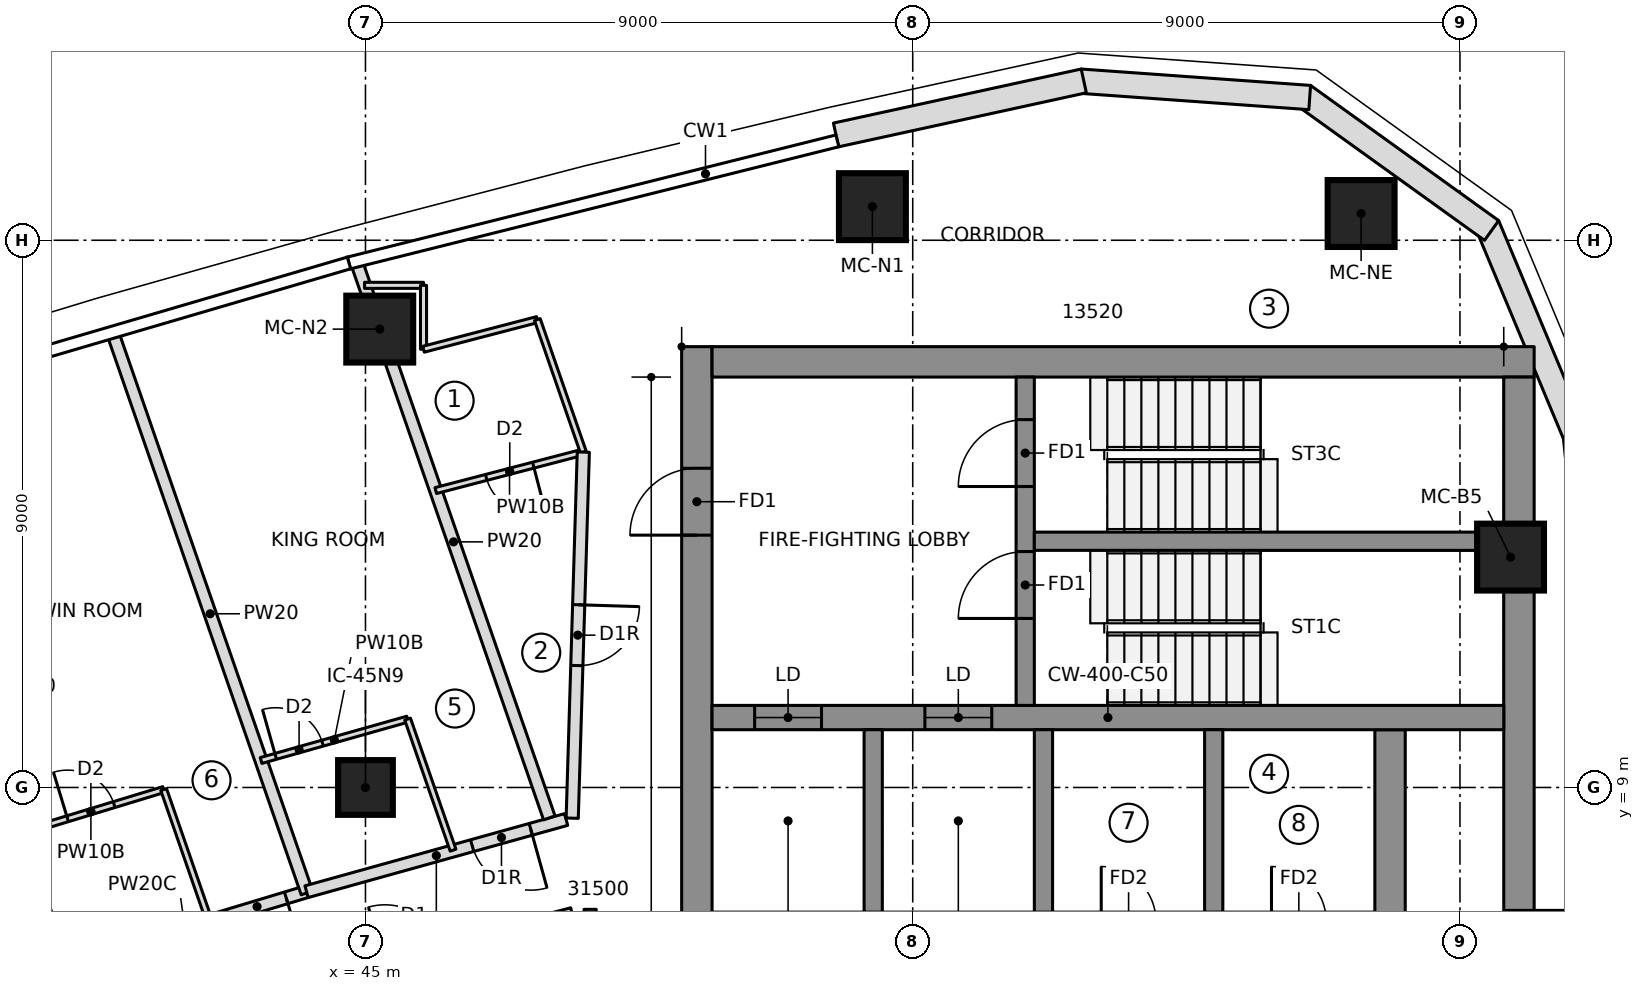
"""IFC4 building model, lengths in metres.
Left out: names, types, materials, properties, quantities, classifications, styles, units other than length and angle.
Written with IfcOpenShell. Run it as: python <this file> out.ifc"""

import sys

from ifc_helpers import new_model, si_unit, direction, frame, frame_2d, origin, origin_2d, place, context, subcontext, project, spatial, polyline, rectangle, outline, extrude, element, fill, save


model = new_model("IFC4")
c1 = context("Model", 3, precision=1e-05, world=origin(), true_north=direction((0.0, 1.0)))
c2 = subcontext(c1, "Body", "Model", "MODEL_VIEW")
j1 = project(units=[si_unit("LENGTHUNIT", "METRE"), si_unit("PLANEANGLEUNIT", "RADIAN")], contexts=[c1])
p1 = place(None, origin())
s1 = spatial("IfcSite", under=j1, at=p1, CompositionType="ELEMENT")
p2 = place(p1, origin())
s2 = spatial("IfcBuilding", under=s1, at=p2, CompositionType="ELEMENT")
p3 = place(p2, frame((0.0, 0.0, 289.2)))
s3 = spatial("IfcBuildingStorey", under=s2, at=p3, CompositionType="ELEMENT", Elevation=289.2)
p4 = place(p3, frame((50.45, 6.65, 0.0), z_axis=(0.0, 0.0, 1.0), x_axis=(0.0, 1.0, 0.0)))
e1 = element("IfcWall", 1, at=p4, inside=s3, PredefinedType="SHEAR", context=c2, shape_type="SweptSolid", body=[
    extrude(rectangle(XDim=9.6, YDim=0.5, at=frame_2d((4.8, 0.0))), origin(), (0.0, 0.0, 1.0), 3.55),
])
p5 = place(p4, frame((6.5, 0.0, 0.0)))
e2 = element("IfcOpeningElement", 2, at=p5, cuts=e1, PredefinedType="OPENING", context=c2, shape_type="SweptSolid", body=[
    extrude(rectangle(XDim=1.1, YDim=2.1, at=frame_2d((0.55, 1.05))), frame((0.0, 0.26, 0.0), z_axis=(0.0, -1.0, 0.0), x_axis=(1.0, 0.0, 0.0)), (0.0, 0.0, 1.0), 0.52),
])
p6 = place(p3, frame((50.7, 16.0, 0.0), z_axis=(0.0, 0.0, 1.0), x_axis=(1.0, 0.0, 0.0)))
e3 = element("IfcWall", 3, at=p6, inside=s3, PredefinedType="SHEAR", context=c2, shape_type="SweptSolid", body=[
    extrude(rectangle(XDim=13.52, YDim=0.5, at=frame_2d((6.76, 0.0))), origin(), (0.0, 0.0, 1.0), 3.55),
])
p7 = place(p3, frame((63.97, 6.903, 0.0), z_axis=(0.0, 0.0, 1.0), x_axis=(0.0, 1.0, 0.0)))
e4 = element("IfcWall", 4, at=p7, inside=s3, PredefinedType="SHEAR", context=c2, shape_type="SweptSolid", body=[
    extrude(rectangle(XDim=8.847, YDim=0.5, at=frame_2d((4.423, 0.0))), origin(), (0.0, 0.0, 1.0), 3.55),
])
p8 = place(p3, frame((61.85, -9.95, 0.0), z_axis=(0.0, 0.0, 1.0), x_axis=(0.0, 1.0, 0.0)))
e5 = element("IfcWall", 5, at=p8, inside=s3, PredefinedType="SHEAR", context=c2, shape_type="SweptSolid", body=[
    extrude(rectangle(XDim=19.9, YDim=0.5, at=frame_2d((9.95, 0.0))), origin(), (0.0, 0.0, 1.0), 3.55),
])
p9 = place(p3, frame((50.7, 10.15, 0.0), z_axis=(0.0, 0.0, 1.0), x_axis=(1.0, 0.0, 0.0)))
e6 = element("IfcWall", 6, at=p9, inside=s3, PredefinedType="SHEAR", context=c2, shape_type="SweptSolid", body=[
    extrude(rectangle(XDim=13.02, YDim=0.4, at=frame_2d((6.51, 0.0))), origin(), (0.0, 0.0, 1.0), 3.55),
])
p10 = place(p9, frame((0.7, 0.0, 0.0)))
e7 = element("IfcOpeningElement", 7, at=p10, cuts=e6, PredefinedType="OPENING", context=c2, shape_type="SweptSolid", body=[
    extrude(rectangle(XDim=1.1, YDim=2.1, at=frame_2d((0.55, 1.05))), frame((0.0, 0.21, 0.0), z_axis=(0.0, -1.0, 0.0), x_axis=(1.0, 0.0, 0.0)), (0.0, 0.0, 1.0), 0.42),
])
p11 = place(p9, frame((3.5, 0.0, 0.0)))
e8 = element("IfcOpeningElement", 8, at=p11, cuts=e6, PredefinedType="OPENING", context=c2, shape_type="SweptSolid", body=[
    extrude(rectangle(XDim=1.1, YDim=2.1, at=frame_2d((0.55, 1.05))), frame((0.0, 0.21, 0.0), z_axis=(0.0, -1.0, 0.0), x_axis=(1.0, 0.0, 0.0)), (0.0, 0.0, 1.0), 0.42),
])
for number, where, z_axis, x_axis in (
    (9, (53.35, 6.95, 0.0), (0.0, 0.0, 1.0), (0.0, 1.0, 0.0)),
    (10, (56.15, 6.95, 0.0), (0.0, 0.0, 1.0), (0.0, 1.0, 0.0)),
    (11, (58.95, 6.95, 0.0), (0.0, 0.0, 1.0), (0.0, 1.0, 0.0)),
):
    element("IfcWall", number, at=place(p3, frame(where, z_axis=z_axis, x_axis=x_axis)), inside=s3, PredefinedType="SHEAR", context=c2, shape_type="SweptSolid", body=[
        extrude(rectangle(XDim=3.0, YDim=0.3, at=frame_2d((1.5, 0.0))), origin(), (0.0, 0.0, 1.0), 3.55),
    ])
p12 = place(p3, frame((55.85, 10.35, 0.0), z_axis=(0.0, 0.0, 1.0), x_axis=(0.0, 1.0, 0.0)))
e12 = element("IfcWall", 12, at=p12, inside=s3, PredefinedType="SHEAR", context=c2, shape_type="SweptSolid", body=[
    extrude(rectangle(XDim=5.4, YDim=0.3, at=frame_2d((2.7, 0.0))), origin(), (0.0, 0.0, 1.0), 3.55),
])
p13 = place(p12, frame((1.43, 0.0, 0.0)))
e13 = element("IfcOpeningElement", 13, at=p13, cuts=e12, PredefinedType="OPENING", context=c2, shape_type="SweptSolid", body=[
    extrude(rectangle(XDim=1.1, YDim=2.1, at=frame_2d((0.55, 1.05))), frame((0.0, 0.16, 0.0), z_axis=(0.0, -1.0, 0.0), x_axis=(1.0, 0.0, 0.0)), (0.0, 0.0, 1.0), 0.32),
])
p14 = place(p12, frame((3.6, 0.0, 0.0)))
e14 = element("IfcOpeningElement", 14, at=p14, cuts=e12, PredefinedType="OPENING", context=c2, shape_type="SweptSolid", body=[
    extrude(rectangle(XDim=1.1, YDim=2.1, at=frame_2d((0.55, 1.05))), frame((0.0, 0.16, 0.0), z_axis=(0.0, -1.0, 0.0), x_axis=(1.0, 0.0, 0.0)), (0.0, 0.0, 1.0), 0.32),
])
p15 = place(p3, frame((56.0, 13.05, 0.0), z_axis=(0.0, 0.0, 1.0), x_axis=(1.0, 0.0, 0.0)))
e15 = element("IfcWall", 15, at=p15, inside=s3, PredefinedType="SHEAR", context=c2, shape_type="SweptSolid", body=[
    extrude(rectangle(XDim=7.72, YDim=0.3, at=frame_2d((3.86, 0.0))), origin(), (0.0, 0.0, 1.0), 3.55),
])
for number, where, z_axis, x_axis in (
    (16, (63.832, 12.789, 0.0), (0.0, 0.0, 1.0), (1.0, 0.0, 0.0)),
    (17, (61.374, 18.44, 0.0), (0.0, 0.0, 1.0), (1.0, 0.0, 0.0)),
    (18, (53.337, 18.553, 0.0), (0.0, 0.0, 1.0), (1.0, 0.0, 0.0)),
    (19, (45.235, 16.539, 0.0), (0.0, 0.0, 1.0), (1.0, 0.0, 0.0)),
):
    element("IfcColumn", number, at=place(p3, frame(where, z_axis=z_axis, x_axis=x_axis)), inside=s3, PredefinedType="COLUMN", context=c2, shape_type="SweptSolid", body=[
        extrude(rectangle(XDim=1.1, YDim=1.1, at=origin_2d()), origin(), (0.0, 0.0, 1.0), 3.55),
    ])
p16 = place(p3, frame((45.0, 9.0, 0.0), z_axis=(0.0, 0.0, 1.0), x_axis=(1.0, 0.0, 0.0)))
e20 = element("IfcColumn", 20, at=p16, inside=s3, PredefinedType="COLUMN", context=c2, shape_type="SweptSolid", body=[
    extrude(rectangle(XDim=0.9, YDim=0.9, at=origin_2d()), origin(), (0.0, 0.0, 1.0), 3.55),
])
p17 = place(p3, frame((65.331, 10.571, 0.0), z_axis=(0.0, 0.0, 1.0), x_axis=(-0.102249826987, 0.994758751096, 0.0)))
e21 = element("IfcWall", 21, at=p17, inside=s3, PredefinedType="NOTDEFINED", context=c2, shape_type="SweptSolid", body=[
    extrude(outline(polyline([(-0.003, -0.2), (4.263, -0.2), (4.204, 0.2), (0.003, 0.2), (-0.003, -0.2)])), origin(), (0.0, 0.0, 1.0), 3.25),
])
p18 = place(p3, frame((64.898, 14.782, 0.0), z_axis=(0.0, 0.0, 1.0), x_axis=(-0.385285857918, 0.922797273343, 0.0)))
e22 = element("IfcWall", 22, at=p18, inside=s3, PredefinedType="NOTDEFINED", context=c2, shape_type="SweptSolid", body=[
    extrude(outline(polyline([(-0.03, -0.2), (3.753, -0.2), (3.64, 0.2), (0.03, 0.2), (-0.03, -0.2)])), origin(), (0.0, 0.0, 1.0), 3.25),
])
p19 = place(p3, frame((63.474, 18.194, 0.0), z_axis=(0.0, 0.0, 1.0), x_axis=(-0.811962548682, 0.583709533533, 0.0)))
e23 = element("IfcWall", 23, at=p19, inside=s3, PredefinedType="NOTDEFINED", context=c2, shape_type="SweptSolid", body=[
    extrude(outline(polyline([(-0.057, -0.2), (3.753, -0.2), (3.64, 0.2), (0.057, 0.2), (-0.057, -0.2)])), origin(), (0.0, 0.0, 1.0), 3.25),
])
p20 = place(p3, frame((60.472, 20.352, 0.0), z_axis=(0.0, 0.0, 1.0), x_axis=(-0.99746272096, 0.071190731806, 0.0)))
e24 = element("IfcWall", 24, at=p20, inside=s3, PredefinedType="NOTDEFINED", context=c2, shape_type="SweptSolid", body=[
    extrude(outline(polyline([(-0.057, -0.2), (3.726, -0.2), (3.668, 0.2), (0.057, 0.2), (-0.057, -0.2)])), origin(), (0.0, 0.0, 1.0), 3.25),
])
p21 = place(p3, frame((56.785, 20.615, 0.0), z_axis=(0.0, 0.0, 1.0), x_axis=(-0.977020225348, -0.213146614471, 0.0)))
e25 = element("IfcWall", 25, at=p21, inside=s3, PredefinedType="NOTDEFINED", context=c2, shape_type="SweptSolid", body=[
    extrude(outline(polyline([(-0.029, -0.2), (4.142, -0.2), (4.142, 0.2), (0.029, 0.2), (-0.029, -0.2)])), origin(), (0.0, 0.0, 1.0), 3.25),
])
p22 = place(p3, frame((40.042, 6.064, 0.0), z_axis=(0.0, 0.0, 1.0), x_axis=(-0.327710853631, 0.944778067279, 0.0)))
e26 = element("IfcWall", 26, at=p22, inside=s3, PredefinedType="PARTITIONING", context=c2, shape_type="SweptSolid", body=[
    extrude(rectangle(XDim=9.707, YDim=0.2, at=frame_2d((4.854, 0.0))), origin(), (0.0, 0.0, 1.0), 3.25),
])
p23 = place(p3, frame((44.031, 7.286, 0.0), z_axis=(0.0, 0.0, 1.0), x_axis=(-0.957521424208, -0.288362137222, 0.0)))
e27 = element("IfcWall", 27, at=p23, inside=s3, PredefinedType="PARTITIONING", context=c2, shape_type="SweptSolid", body=[
    extrude(rectangle(XDim=4.173, YDim=0.2, at=frame_2d((2.086, 0.0))), origin(), (0.0, 0.0, 1.0), 3.25),
])
p24 = place(p23, frame((0.35, 0.0, 0.0)))
e28 = element("IfcOpeningElement", 28, at=p24, cuts=e27, PredefinedType="OPENING", context=c2, shape_type="SweptSolid", body=[
    extrude(rectangle(XDim=1.0, YDim=2.1, at=frame_2d((0.5, 1.05))), frame((0.0, 0.11, 0.0), z_axis=(0.0, -1.0, 0.0), x_axis=(1.0, 0.0, 0.0)), (0.0, 0.0, 1.0), 0.22),
])
p25 = place(p3, frame((39.288, 8.238, 0.0), z_axis=(0.0, 0.0, 1.0), x_axis=(0.956723503196, 0.290998519638, 0.0)))
e29 = element("IfcWall", 29, at=p25, inside=s3, PredefinedType="PARTITIONING", context=c2, shape_type="SweptSolid", body=[
    extrude(rectangle(XDim=2.502, YDim=0.1, at=frame_2d((1.251, 0.0))), origin(), (0.0, 0.0, 1.0), 3.25),
])
p26 = place(p25, frame((0.85, 0.0, 0.0)))
e30 = element("IfcOpeningElement", 30, at=p26, cuts=e29, PredefinedType="OPENING", context=c2, shape_type="SweptSolid", body=[
    extrude(rectangle(XDim=0.8, YDim=2.1, at=frame_2d((0.4, 1.05))), frame((0.0, 0.06, 0.0), z_axis=(0.0, -1.0, 0.0), x_axis=(1.0, 0.0, 0.0)), (0.0, 0.0, 1.0), 0.12),
])
p27 = place(p3, frame((41.681, 8.966, 0.0), z_axis=(0.0, 0.0, 1.0), x_axis=(0.327743427431, -0.944766767925, 0.0)))
e31 = element("IfcWall", 31, at=p27, inside=s3, PredefinedType="PARTITIONING", context=c2, shape_type="SweptSolid", body=[
    extrude(rectangle(XDim=2.279, YDim=0.1, at=frame_2d((1.139, 0.0))), origin(), (0.0, 0.0, 1.0), 3.25),
])
p28 = place(p3, frame((44.038, 7.267, 0.0), z_axis=(0.0, 0.0, 1.0), x_axis=(-0.327714576096, 0.944776776077, 0.0)))
e32 = element("IfcWall", 32, at=p28, inside=s3, PredefinedType="PARTITIONING", context=c2, shape_type="SweptSolid", body=[
    extrude(rectangle(XDim=9.717, YDim=0.2, at=frame_2d((4.858, 0.0))), origin(), (0.0, 0.0, 1.0), 3.25),
])
p29 = place(p3, frame((48.299, 8.473, 0.0), z_axis=(0.0, 0.0, 1.0), x_axis=(-0.96343417102, -0.267945140115, 0.0)))
e33 = element("IfcWall", 33, at=p29, inside=s3, PredefinedType="PARTITIONING", context=c2, shape_type="SweptSolid", body=[
    extrude(rectangle(XDim=4.43, YDim=0.2, at=frame_2d((2.215, 0.0))), origin(), (0.0, 0.0, 1.0), 3.25),
])
p30 = place(p29, frame((0.603, 0.0, 0.0)))
e34 = element("IfcOpeningElement", 34, at=p30, cuts=e33, PredefinedType="OPENING", context=c2, shape_type="SweptSolid", body=[
    extrude(rectangle(XDim=1.0, YDim=2.1, at=frame_2d((0.5, 1.05))), frame((0.0, 0.11, 0.0), z_axis=(0.0, -1.0, 0.0), x_axis=(1.0, 0.0, 0.0)), (0.0, 0.0, 1.0), 0.22),
])
p31 = place(p3, frame((43.283, 9.444, 0.0), z_axis=(0.0, 0.0, 1.0), x_axis=(0.962409173596, 0.271603723424, 0.0)))
e35 = element("IfcWall", 35, at=p31, inside=s3, PredefinedType="PARTITIONING", context=c2, shape_type="SweptSolid", body=[
    extrude(rectangle(XDim=2.504, YDim=0.1, at=frame_2d((1.252, 0.0))), origin(), (0.0, 0.0, 1.0), 3.25),
])
p32 = place(p31, frame((0.25, 0.0, 0.0)))
e36 = element("IfcOpeningElement", 36, at=p32, cuts=e35, PredefinedType="OPENING", context=c2, shape_type="SweptSolid", body=[
    extrude(rectangle(XDim=0.8, YDim=2.1, at=frame_2d((0.4, 1.05))), frame((0.0, 0.06, 0.0), z_axis=(0.0, -1.0, 0.0), x_axis=(1.0, 0.0, 0.0)), (0.0, 0.0, 1.0), 0.12),
])
p33 = place(p3, frame((45.693, 10.124, 0.0), z_axis=(0.0, 0.0, 1.0), x_axis=(0.327764902685, -0.944759317799, 0.0)))
e37 = element("IfcWall", 37, at=p33, inside=s3, PredefinedType="PARTITIONING", context=c2, shape_type="SweptSolid", body=[
    extrude(rectangle(XDim=2.281, YDim=0.1, at=frame_2d((1.14, 0.0))), origin(), (0.0, 0.0, 1.0), 3.25),
])
p34 = place(p3, frame((48.023, 8.5, 0.0), z_axis=(0.0, 0.0, 1.0), x_axis=(-0.327705598625, 0.944779890043, 0.0)))
e38 = element("IfcWall", 38, at=p34, inside=s3, PredefinedType="PARTITIONING", context=c2, shape_type="SweptSolid", body=[
    extrude(rectangle(XDim=9.61, YDim=0.2, at=frame_2d((4.805, 0.0))), origin(), (0.0, 0.0, 1.0), 3.25),
])
p35 = place(p3, frame((48.583, 14.516, 0.0), z_axis=(0.0, 0.0, 1.0), x_axis=(-0.967665843663, -0.252235633897, 0.0)))
e39 = element("IfcWall", 39, at=p35, inside=s3, PredefinedType="PARTITIONING", context=c2, shape_type="SweptSolid", body=[
    extrude(rectangle(XDim=2.508, YDim=0.1, at=frame_2d((1.254, 0.0))), origin(), (0.0, 0.0, 1.0), 3.25),
])
p36 = place(p35, frame((0.85, 0.0, 0.0)))
e40 = element("IfcOpeningElement", 40, at=p36, cuts=e39, PredefinedType="OPENING", context=c2, shape_type="SweptSolid", body=[
    extrude(rectangle(XDim=0.8, YDim=2.1, at=frame_2d((0.4, 1.05))), frame((0.0, 0.06, 0.0), z_axis=(0.0, -1.0, 0.0), x_axis=(1.0, 0.0, 0.0)), (0.0, 0.0, 1.0), 0.12),
])
p37 = place(p3, frame((44.985, 17.259, 0.0), z_axis=(0.0, 0.0, 1.0), x_axis=(1.0, 0.0, 0.0)))
e41 = element("IfcWall", 41, at=p37, inside=s3, PredefinedType="PARTITIONING", context=c2, shape_type="SweptSolid", body=[
    extrude(rectangle(XDim=0.97, YDim=0.1, at=frame_2d((0.485, 0.0))), origin(), (0.0, 0.0, 1.0), 3.25),
])
p38 = place(p3, frame((45.955, 17.259, 0.0), z_axis=(0.0, 0.0, 1.0), x_axis=(0.0, -1.0, 0.0)))
e42 = element("IfcWall", 42, at=p38, inside=s3, PredefinedType="PARTITIONING", context=c2, shape_type="SweptSolid", body=[
    extrude(rectangle(XDim=1.051, YDim=0.1, at=frame_2d((0.525, 0.0))), origin(), (0.0, 0.0, 1.0), 3.25),
])
p39 = place(p3, frame((45.955, 16.208, 0.0), z_axis=(0.0, 0.0, 1.0), x_axis=(0.967650770907, 0.25229345129, 0.0)))
e43 = element("IfcWall", 43, at=p39, inside=s3, PredefinedType="PARTITIONING", context=c2, shape_type="SweptSolid", body=[
    extrude(rectangle(XDim=1.934, YDim=0.1, at=frame_2d((0.967, 0.0))), origin(), (0.0, 0.0, 1.0), 3.25),
])
p40 = place(p3, frame((47.826, 16.696, 0.0), z_axis=(0.0, 0.0, 1.0), x_axis=(0.327695604762, -0.944783356447, 0.0)))
e44 = element("IfcWall", 44, at=p40, inside=s3, PredefinedType="PARTITIONING", context=c2, shape_type="SweptSolid", body=[
    extrude(rectangle(XDim=2.307, YDim=0.1, at=frame_2d((1.154, 0.0))), origin(), (0.0, 0.0, 1.0), 3.25),
])
p41 = place(p3, frame((47.684, 6.738, 0.0), z_axis=(0.0, 0.0, 1.0), x_axis=(0.967585713416, 0.252542842294, 0.0)))
e45 = element("IfcWall", 45, at=p41, inside=s3, PredefinedType="PARTITIONING", context=c2, shape_type="SweptSolid", body=[
    extrude(rectangle(XDim=0.74, YDim=0.2, at=frame_2d((0.37, 0.0))), origin(), (0.0, 0.0, 1.0), 3.25),
])
p42 = place(p3, frame((48.583, 14.516, 0.0), z_axis=(0.0, 0.0, 1.0), x_axis=(-0.030318578026, -0.999540286245, 0.0)))
e46 = element("IfcWall", 46, at=p42, inside=s3, PredefinedType="PARTITIONING", context=c2, shape_type="SweptSolid", body=[
    extrude(rectangle(XDim=6.023, YDim=0.2, at=frame_2d((3.012, 0.0))), origin(), (0.0, 0.0, 1.0), 3.25),
])
p43 = place(p42, frame((2.512, 0.0, 0.0)))
e47 = element("IfcOpeningElement", 47, at=p43, cuts=e46, PredefinedType="OPENING", context=c2, shape_type="SweptSolid", body=[
    extrude(rectangle(XDim=1.0, YDim=2.1, at=frame_2d((0.5, 1.05))), frame((0.0, 0.11, 0.0), z_axis=(0.0, -1.0, 0.0), x_axis=(1.0, 0.0, 0.0)), (0.0, 0.0, 1.0), 0.22),
])
p44 = place(p3, frame((48.695, 6.996, 0.0), z_axis=(0.0, 0.0, 1.0), x_axis=(0.0, -1.0, 0.0)))
e48 = element("IfcWall", 48, at=p44, inside=s3, PredefinedType="PARTITIONING", context=c2, shape_type="SweptSolid", body=[
    extrude(rectangle(XDim=13.992, YDim=0.2, at=frame_2d((6.996, 0.0))), origin(), (0.0, 0.0, 1.0), 3.25),
])
p45 = place(p26, origin())
e49 = element("IfcDoor", 49, at=p45, inside=s3, OperationType="SINGLE_SWING_LEFT", PredefinedType="DOOR", context=c2, shape_type="SweptSolid", body=[
    extrude(rectangle(XDim=0.8, YDim=2.1, at=frame_2d((0.4, 1.05))), frame((0.0, 0.025, 0.0), z_axis=(0.0, -1.0, 0.0), x_axis=(1.0, 0.0, 0.0)), (0.0, 0.0, 1.0), 0.05),
])
fill(e30, e49)
p46 = place(p24, origin())
e50 = element("IfcDoor", 50, at=p46, inside=s3, OperationType="SINGLE_SWING_RIGHT", PredefinedType="DOOR", context=c2, shape_type="SweptSolid", body=[
    extrude(rectangle(XDim=1.0, YDim=2.1, at=frame_2d((0.5, 1.05))), frame((0.0, 0.025, 0.0), z_axis=(0.0, -1.0, 0.0), x_axis=(1.0, 0.0, 0.0)), (0.0, 0.0, 1.0), 0.05),
])
fill(e28, e50)
p47 = place(p32, origin())
e51 = element("IfcDoor", 51, at=p47, inside=s3, OperationType="SINGLE_SWING_LEFT", PredefinedType="DOOR", context=c2, shape_type="SweptSolid", body=[
    extrude(rectangle(XDim=0.8, YDim=2.1, at=frame_2d((0.4, 1.05))), frame((0.0, 0.025, 0.0), z_axis=(0.0, -1.0, 0.0), x_axis=(1.0, 0.0, 0.0)), (0.0, 0.0, 1.0), 0.05),
])
fill(e36, e51)
p48 = place(p30, origin())
e52 = element("IfcDoor", 52, at=p48, inside=s3, OperationType="SINGLE_SWING_RIGHT", PredefinedType="DOOR", context=c2, shape_type="SweptSolid", body=[
    extrude(rectangle(XDim=1.0, YDim=2.1, at=frame_2d((0.5, 1.05))), frame((0.0, 0.025, 0.0), z_axis=(0.0, -1.0, 0.0), x_axis=(1.0, 0.0, 0.0)), (0.0, 0.0, 1.0), 0.05),
])
fill(e34, e52)
p49 = place(p36, origin())
e53 = element("IfcDoor", 53, at=p49, inside=s3, OperationType="SINGLE_SWING_LEFT", PredefinedType="DOOR", context=c2, shape_type="SweptSolid", body=[
    extrude(rectangle(XDim=0.8, YDim=2.1, at=frame_2d((0.4, 1.05))), frame((0.0, 0.025, 0.0), z_axis=(0.0, -1.0, 0.0), x_axis=(1.0, 0.0, 0.0)), (0.0, 0.0, 1.0), 0.05),
])
fill(e40, e53)
p50 = place(p43, origin())
e54 = element("IfcDoor", 54, at=p50, inside=s3, OperationType="SINGLE_SWING_RIGHT", PredefinedType="DOOR", context=c2, shape_type="SweptSolid", body=[
    extrude(rectangle(XDim=1.0, YDim=2.1, at=frame_2d((0.5, 1.05))), frame((0.0, 0.025, 0.0), z_axis=(0.0, -1.0, 0.0), x_axis=(1.0, 0.0, 0.0)), (0.0, 0.0, 1.0), 0.05),
])
fill(e47, e54)
p51 = place(p10, origin())
e55 = element("IfcDoor", 55, at=p51, inside=s3, OperationType="DOUBLE_DOOR_SLIDING", PredefinedType="DOOR", context=c2, shape_type="SweptSolid", body=[
    extrude(rectangle(XDim=1.1, YDim=2.1, at=frame_2d((0.55, 1.05))), frame((0.0, 0.025, 0.0), z_axis=(0.0, -1.0, 0.0), x_axis=(1.0, 0.0, 0.0)), (0.0, 0.0, 1.0), 0.05),
])
fill(e7, e55)
p52 = place(p11, origin())
e56 = element("IfcDoor", 56, at=p52, inside=s3, OperationType="DOUBLE_DOOR_SLIDING", PredefinedType="DOOR", context=c2, shape_type="SweptSolid", body=[
    extrude(rectangle(XDim=1.1, YDim=2.1, at=frame_2d((0.55, 1.05))), frame((0.0, 0.025, 0.0), z_axis=(0.0, -1.0, 0.0), x_axis=(1.0, 0.0, 0.0)), (0.0, 0.0, 1.0), 0.05),
])
fill(e8, e56)
p53 = place(p13, origin())
e57 = element("IfcDoor", 57, at=p53, inside=s3, OperationType="SINGLE_SWING_RIGHT", PredefinedType="DOOR", context=c2, shape_type="SweptSolid", body=[
    extrude(rectangle(XDim=1.1, YDim=2.1, at=frame_2d((0.55, 1.05))), frame((0.0, 0.025, 0.0), z_axis=(0.0, -1.0, 0.0), x_axis=(1.0, 0.0, 0.0)), (0.0, 0.0, 1.0), 0.05),
])
fill(e13, e57)
p54 = place(p14, origin())
e58 = element("IfcDoor", 58, at=p54, inside=s3, OperationType="SINGLE_SWING_RIGHT", PredefinedType="DOOR", context=c2, shape_type="SweptSolid", body=[
    extrude(rectangle(XDim=1.1, YDim=2.1, at=frame_2d((0.55, 1.05))), frame((0.0, 0.025, 0.0), z_axis=(0.0, -1.0, 0.0), x_axis=(1.0, 0.0, 0.0)), (0.0, 0.0, 1.0), 0.05),
])
fill(e14, e58)
p55 = place(p5, origin())
e59 = element("IfcDoor", 59, at=p55, inside=s3, OperationType="SINGLE_SWING_RIGHT", PredefinedType="DOOR", context=c2, shape_type="SweptSolid", body=[
    extrude(rectangle(XDim=1.1, YDim=2.1, at=frame_2d((0.55, 1.05))), frame((0.0, 0.025, 0.0), z_axis=(0.0, -1.0, 0.0), x_axis=(1.0, 0.0, 0.0)), (0.0, 0.0, 1.0), 0.05),
])
fill(e2, e59)
save(model, sys.argv[1])
